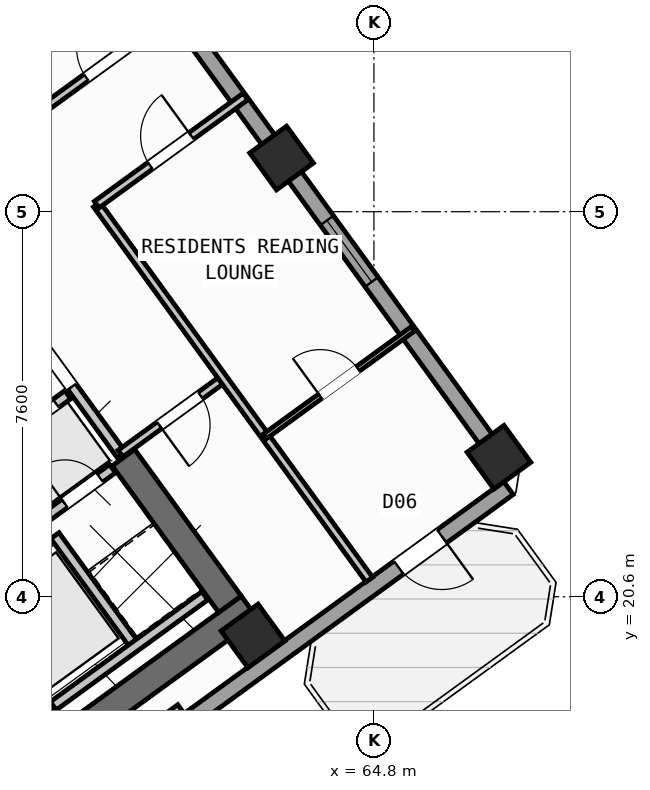
"""IFC4 building model, lengths in metres.
Left out: names, types, materials, properties, quantities, classifications, styles, units other than length and angle.
Written with IfcOpenShell. Run it as: python <this file> out.ifc"""

import sys

from ifc_helpers import new_model, si_unit, direction, frame, frame_2d, origin, origin_2d, place, context, subcontext, project, spatial, rectangle, hollow_rectangle, extrude, source, transform, mapped, element, fill, save


model = new_model("IFC4")
c1 = context("Model", 3, precision=1e-05, world=origin(), true_north=direction((0.0, 1.0)))
c2 = subcontext(c1, "Body", "Model", "MODEL_VIEW")
j1 = project(units=[si_unit("LENGTHUNIT", "METRE"), si_unit("PLANEANGLEUNIT", "RADIAN")], contexts=[c1])
p1 = place(None, origin())
s1 = spatial("IfcSite", under=j1, at=p1, CompositionType="ELEMENT")
p2 = place(p1, origin())
s2 = spatial("IfcBuilding", under=s1, at=p2, CompositionType="ELEMENT")
p3 = place(p2, frame((0.0, 0.0, 100.8)))
s3 = spatial("IfcBuildingStorey", under=s2, at=p3, CompositionType="ELEMENT", Elevation=100.8)
p4 = place(p3, frame((52.359, 13.14, 0.0), z_axis=(0.0, 0.0, 1.0), x_axis=(0.809014896919, 0.587788139183, 0.0)))
e1 = element("IfcWall", 1, at=p4, inside=s3, PredefinedType="SHEAR", context=c2, shape_type="SweptSolid", body=[
    extrude(rectangle(XDim=12.34, YDim=0.55, at=frame_2d((6.17, 0.0))), origin(), (0.0, 0.0, 1.0), 4.25),
])
p5 = place(p3, frame((61.958, 20.454, 0.0), z_axis=(0.0, 0.0, 1.0), x_axis=(-0.587802113096, 0.809004744015, 0.0)))
e2 = element("IfcWall", 2, at=p5, inside=s3, PredefinedType="SHEAR", context=c2, shape_type="SweptSolid", body=[
    extrude(rectangle(XDim=3.575, YDim=0.55, at=frame_2d((1.788, 0.0))), origin(), (0.0, 0.0, 1.0), 4.25),
])
m1 = source(origin(), c2, "Body", "SweptSolid", [
    extrude(hollow_rectangle(XDim=0.9, YDim=0.9, WallThickness=0.036, at=origin_2d()), origin(), (0.0, 0.0, 1.0), 4.5),
])
for number, where, z_axis, x_axis in (
    (3, (62.414, 19.827, 0.0), (0.0, 0.0, 1.0), (0.809, 0.588, 0.0)),
    (4, (67.268, 23.354, 0.0), (0.0, 0.0, 1.0), (0.809, 0.588, 0.0)),
    (5, (62.977, 29.259, 0.0), (0.0, 0.0, 1.0), (0.809, 0.588, 0.0)),
):
    element("IfcColumn", number, at=place(p3, frame(where, z_axis=z_axis, x_axis=x_axis)), inside=s3, PredefinedType="COLUMN", context=c2, shape_type="MappedRepresentation", body=[
        mapped(m1, transform((0.0, 0.0, 0.0), scale=1.0)),
    ])
p6 = place(p3, frame((54.81, 40.5, 0.0), z_axis=(0.0, 0.0, 1.0), x_axis=(0.587783625747, -0.809018176127, 0.0)))
e6 = element("IfcWall", 6, at=p6, inside=s3, PredefinedType="STANDARD", context=c2, shape_type="SweptSolid", body=[
    extrude(rectangle(XDim=21.587, YDim=0.32, at=frame_2d((10.794, 0.0))), origin(), (0.0, 0.0, 1.0), 3.675),
])
p7 = place(p6, frame((1.503, 0.0, 0.85)))
e7 = element("IfcOpeningElement", 7, at=p7, cuts=e6, PredefinedType="OPENING", context=c2, shape_type="SweptSolid", body=[
    extrude(rectangle(XDim=1.5, YDim=1.5, at=frame_2d((0.75, 0.75))), frame((0.0, 0.17, 0.0), z_axis=(0.0, -1.0, 0.0), x_axis=(1.0, 0.0, 0.0)), (0.0, 0.0, 1.0), 0.34),
])
p8 = place(p6, frame((7.854, 0.0, 0.85)))
e8 = element("IfcOpeningElement", 8, at=p8, cuts=e6, PredefinedType="OPENING", context=c2, shape_type="SweptSolid", body=[
    extrude(rectangle(XDim=1.5, YDim=1.5, at=frame_2d((0.75, 0.75))), frame((0.0, 0.17, 0.0), z_axis=(0.0, -1.0, 0.0), x_axis=(1.0, 0.0, 0.0)), (0.0, 0.0, 1.0), 0.34),
])
p9 = place(p6, frame((15.417, 0.0, 0.85)))
e9 = element("IfcOpeningElement", 9, at=p9, cuts=e6, PredefinedType="OPENING", context=c2, shape_type="SweptSolid", body=[
    extrude(rectangle(XDim=1.5, YDim=1.5, at=frame_2d((0.75, 0.75))), frame((0.0, 0.17, 0.0), z_axis=(0.0, -1.0, 0.0), x_axis=(1.0, 0.0, 0.0)), (0.0, 0.0, 1.0), 0.34),
])
p10 = place(p3, frame((67.454, 22.747, 0.0), z_axis=(0.0, 0.0, 1.0), x_axis=(-0.809021120468, -0.587779573171, 0.0)))
e10 = element("IfcWall", 10, at=p10, inside=s3, PredefinedType="STANDARD", context=c2, shape_type="SweptSolid", body=[
    extrude(rectangle(XDim=17.588, YDim=0.32, at=frame_2d((8.794, 0.0))), origin(), (0.0, 0.0, 1.0), 4.25),
])
p11 = place(p10, frame((1.624, 0.0, 0.0)))
e11 = element("IfcOpeningElement", 11, at=p11, cuts=e10, PredefinedType="OPENING", context=c2, shape_type="SweptSolid", body=[
    extrude(rectangle(XDim=1.05, YDim=2.15, at=frame_2d((0.525, 1.075))), frame((0.0, 0.17, 0.0), z_axis=(0.0, -1.0, 0.0), x_axis=(1.0, 0.0, 0.0)), (0.0, 0.0, 1.0), 0.34),
])
p12 = place(p10, frame((7.794, 0.0, 0.65)))
e12 = element("IfcOpeningElement", 12, at=p12, cuts=e10, PredefinedType="OPENING", context=c2, shape_type="SweptSolid", body=[
    extrude(rectangle(XDim=2.8, YDim=2.1, at=frame_2d((1.4, 1.05))), frame((0.0, 0.17, 0.0), z_axis=(0.0, -1.0, 0.0), x_axis=(1.0, 0.0, 0.0)), (0.0, 0.0, 1.0), 0.34),
])
p13 = place(p10, frame((12.994, 0.0, 0.65)))
e13 = element("IfcOpeningElement", 13, at=p13, cuts=e10, PredefinedType="OPENING", context=c2, shape_type="SweptSolid", body=[
    extrude(rectangle(XDim=2.8, YDim=2.1, at=frame_2d((1.4, 1.05))), frame((0.0, 0.17, 0.0), z_axis=(0.0, -1.0, 0.0), x_axis=(1.0, 0.0, 0.0)), (0.0, 0.0, 1.0), 0.34),
])
p14 = place(p3, frame((52.472, 14.013, 0.0), z_axis=(0.0, 0.0, 1.0), x_axis=(0.809028366311, 0.587769599847, 0.0)))
e14 = element("IfcWall", 14, at=p14, inside=s3, PredefinedType="SHEAR", context=c2, shape_type="SweptSolid", body=[
    extrude(rectangle(XDim=7.33, YDim=0.26, at=frame_2d((3.665, 0.0))), origin(), (0.0, 0.0, 1.0), 4.25),
])
p15 = place(p3, frame((58.41, 18.327, 0.0), z_axis=(0.0, 0.0, 1.0), x_axis=(-0.58776738483, 0.809029975545, 0.0)))
e15 = element("IfcWall", 15, at=p15, inside=s3, PredefinedType="SHEAR", context=c2, shape_type="SweptSolid", body=[
    extrude(rectangle(XDim=3.16, YDim=0.26, at=frame_2d((1.58, 0.0))), origin(), (0.0, 0.0, 1.0), 4.25),
])
p16 = place(p3, frame((56.553, 20.884, 0.0), z_axis=(0.0, 0.0, 1.0), x_axis=(0.809023564264, 0.58777620951, 0.0)))
e16 = element("IfcWall", 16, at=p16, inside=s3, PredefinedType="STANDARD", context=c2, shape_type="SweptSolid", body=[
    extrude(rectangle(XDim=3.818, YDim=0.2, at=frame_2d((1.909, 0.0))), origin(), (0.0, 0.0, 1.0), 4.24),
])
p17 = place(p16, frame((0.69, 0.0, 0.0)))
e17 = element("IfcOpeningElement", 17, at=p17, cuts=e16, PredefinedType="OPENING", context=c2, shape_type="SweptSolid", body=[
    extrude(rectangle(XDim=1.1, YDim=2.15, at=frame_2d((0.55, 1.075))), frame((0.0, 0.11, 0.0), z_axis=(0.0, -1.0, 0.0), x_axis=(1.0, 0.0, 0.0)), (0.0, 0.0, 1.0), 0.22),
])
p18 = place(p16, frame((2.65, 0.0, 0.0)))
e18 = element("IfcOpeningElement", 18, at=p18, cuts=e16, PredefinedType="OPENING", context=c2, shape_type="SweptSolid", body=[
    extrude(rectangle(XDim=0.86, YDim=2.05, at=frame_2d((0.43, 1.025))), frame((0.0, 0.11, 0.0), z_axis=(0.0, -1.0, 0.0), x_axis=(1.0, 0.0, 0.0)), (0.0, 0.0, 1.0), 0.22),
])
p19 = place(p3, frame((54.421, 21.436, 0.0), z_axis=(0.0, 0.0, 1.0), x_axis=(0.809013710463, 0.587789772183, 0.0)))
e19 = element("IfcWall", 19, at=p19, inside=s3, PredefinedType="STANDARD", context=c2, shape_type="SweptSolid", body=[
    extrude(rectangle(XDim=5.36, YDim=0.2, at=frame_2d((2.68, 0.0))), origin(), (0.0, 0.0, 1.0), 4.24),
])
p20 = place(p19, frame((0.37, 0.0, 0.0)))
e20 = element("IfcOpeningElement", 20, at=p20, cuts=e19, PredefinedType="OPENING", context=c2, shape_type="SweptSolid", body=[
    extrude(rectangle(XDim=1.1, YDim=2.15, at=frame_2d((0.55, 1.075))), frame((0.0, 0.11, 0.0), z_axis=(0.0, -1.0, 0.0), x_axis=(1.0, 0.0, 0.0)), (0.0, 0.0, 1.0), 0.22),
])
p21 = place(p19, frame((2.17, 0.0, 0.0)))
e21 = element("IfcOpeningElement", 21, at=p21, cuts=e19, PredefinedType="OPENING", context=c2, shape_type="SweptSolid", body=[
    extrude(rectangle(XDim=1.1, YDim=2.15, at=frame_2d((0.55, 1.075))), frame((0.0, 0.11, 0.0), z_axis=(0.0, -1.0, 0.0), x_axis=(1.0, 0.0, 0.0)), (0.0, 0.0, 1.0), 0.22),
])
p22 = place(p19, frame((3.97, 0.0, 0.0)))
e22 = element("IfcOpeningElement", 22, at=p22, cuts=e19, PredefinedType="OPENING", context=c2, shape_type="SweptSolid", body=[
    extrude(rectangle(XDim=1.1, YDim=2.15, at=frame_2d((0.55, 1.075))), frame((0.0, 0.11, 0.0), z_axis=(0.0, -1.0, 0.0), x_axis=(1.0, 0.0, 0.0)), (0.0, 0.0, 1.0), 0.22),
])
p23 = place(p3, frame((60.067, 19.655, 0.0), z_axis=(0.0, 0.0, 1.0), x_axis=(-0.587800520745, 0.809005900975, 0.0)))
e23 = element("IfcWall", 23, at=p23, inside=s3, PredefinedType="STANDARD", context=c2, shape_type="SweptSolid", body=[
    extrude(rectangle(XDim=2.66, YDim=0.2, at=frame_2d((1.33, 0.0))), origin(), (0.0, 0.0, 1.0), 4.24),
])
p24 = place(p3, frame((58.472, 18.447, 0.0), z_axis=(0.0, 0.0, 1.0), x_axis=(0.809018631237, 0.587782999339, 0.0)))
e24 = element("IfcWall", 24, at=p24, inside=s3, PredefinedType="STANDARD", context=c2, shape_type="SweptSolid", body=[
    extrude(rectangle(XDim=3.698, YDim=0.2, at=frame_2d((1.849, 0.0))), origin(), (0.0, 0.0, 1.0), 4.24),
])
p25 = place(p3, frame((59.827, 23.386, 0.0), z_axis=(0.0, 0.0, 1.0), x_axis=(-0.587803840107, 0.809003489211, 0.0)))
e25 = element("IfcWall", 25, at=p25, inside=s3, PredefinedType="STANDARD", context=c2, shape_type="SweptSolid", body=[
    extrude(rectangle(XDim=2.96, YDim=0.2, at=frame_2d((1.48, 0.0))), origin(), (0.0, 0.0, 1.0), 4.24),
])
p26 = place(p25, frame((1.68, 0.0, 0.0)))
e26 = element("IfcOpeningElement", 26, at=p26, cuts=e25, PredefinedType="OPENING", context=c2, shape_type="SweptSolid", body=[
    extrude(rectangle(XDim=1.0, YDim=2.1, at=frame_2d((0.5, 1.05))), frame((0.0, 0.11, 0.0), z_axis=(0.0, -1.0, 0.0), x_axis=(1.0, 0.0, 0.0)), (0.0, 0.0, 1.0), 0.22),
])
p27 = place(p3, frame((59.798, 23.427, 0.0), z_axis=(0.0, 0.0, 1.0), x_axis=(0.809034604122, 0.587761013791, 0.0)))
e27 = element("IfcWall", 27, at=p27, inside=s3, PredefinedType="PARTITIONING", context=c2, shape_type="SweptSolid", body=[
    extrude(rectangle(XDim=2.51, YDim=0.16, at=frame_2d((1.255, 0.0))), origin(), (0.0, 0.0, 1.0), 4.24),
])
p28 = place(p27, frame((0.95, 0.0, 0.0)))
e28 = element("IfcOpeningElement", 28, at=p28, cuts=e27, PredefinedType="OPENING", context=c2, shape_type="SweptSolid", body=[
    extrude(rectangle(XDim=1.0, YDim=2.1, at=frame_2d((0.5, 1.05))), frame((0.0, 0.09, 0.0), z_axis=(0.0, -1.0, 0.0), x_axis=(1.0, 0.0, 0.0)), (0.0, 0.0, 1.0), 0.18),
])
p29 = place(p3, frame((64.709, 20.938, 0.0), z_axis=(0.0, 0.0, 1.0), x_axis=(-0.587776590479, 0.80902328748, 0.0)))
e29 = element("IfcWall", 29, at=p29, inside=s3, PredefinedType="PARTITIONING", context=c2, shape_type="SweptSolid", body=[
    extrude(rectangle(XDim=9.15, YDim=0.16, at=frame_2d((4.575, 0.0))), origin(), (0.0, 0.0, 1.0), 4.24),
])
p30 = place(p3, frame((59.331, 28.341, 0.0), z_axis=(0.0, 0.0, 1.0), x_axis=(0.809003564202, 0.587803736896, 0.0)))
e30 = element("IfcWall", 30, at=p30, inside=s3, PredefinedType="PARTITIONING", context=c2, shape_type="SweptSolid", body=[
    extrude(rectangle(XDim=3.63, YDim=0.16, at=frame_2d((1.815, 0.0))), origin(), (0.0, 0.0, 1.0), 4.24),
])
p31 = place(p30, frame((1.305, 0.0, 0.0)))
e31 = element("IfcOpeningElement", 31, at=p31, cuts=e30, PredefinedType="OPENING", context=c2, shape_type="SweptSolid", body=[
    extrude(rectangle(XDim=1.0, YDim=2.1, at=frame_2d((0.5, 1.05))), frame((0.0, 0.09, 0.0), z_axis=(0.0, -1.0, 0.0), x_axis=(1.0, 0.0, 0.0)), (0.0, 0.0, 1.0), 0.18),
])
p32 = place(p3, frame((58.067, 30.08, 0.0), z_axis=(0.0, 0.0, 1.0), x_axis=(0.809012309495, 0.587791700422, 0.0)))
e32 = element("IfcWall", 32, at=p32, inside=s3, PredefinedType="PARTITIONING", context=c2, shape_type="SweptSolid", body=[
    extrude(rectangle(XDim=3.63, YDim=0.16, at=frame_2d((1.815, 0.0))), origin(), (0.0, 0.0, 1.0), 4.24),
])
p33 = place(p32, frame((1.305, 0.0, 0.0)))
e33 = element("IfcOpeningElement", 33, at=p33, cuts=e32, PredefinedType="OPENING", context=c2, shape_type="SweptSolid", body=[
    extrude(rectangle(XDim=1.0, YDim=2.1, at=frame_2d((0.5, 1.05))), frame((0.0, 0.09, 0.0), z_axis=(0.0, -1.0, 0.0), x_axis=(1.0, 0.0, 0.0)), (0.0, 0.0, 1.0), 0.18),
])
p34 = place(p3, frame((62.653, 23.768, 0.0), z_axis=(0.0, 0.0, 1.0), x_axis=(0.809037198293, 0.58775744298, 0.0)))
e34 = element("IfcWall", 34, at=p34, inside=s3, PredefinedType="PARTITIONING", context=c2, shape_type="SweptSolid", body=[
    extrude(rectangle(XDim=3.61, YDim=0.11, at=frame_2d((1.805, 0.0))), origin(), (0.0, 0.0, 1.0), 4.24),
])
p35 = place(p34, frame((1.345, 0.0, 0.0)))
e35 = element("IfcOpeningElement", 35, at=p35, cuts=e34, PredefinedType="OPENING", context=c2, shape_type="SweptSolid", body=[
    extrude(rectangle(XDim=0.92, YDim=2.08, at=frame_2d((0.46, 1.04))), frame((0.0, 0.065, 0.0), z_axis=(0.0, -1.0, 0.0), x_axis=(1.0, 0.0, 0.0)), (0.0, 0.0, 1.0), 0.13),
])
m2 = source(origin(), c2, "Body", "SweptSolid", [
    extrude(rectangle(XDim=1.05, YDim=2.15, at=frame_2d((0.525, 1.075))), frame((0.0, 0.025, 0.0), z_axis=(0.0, -1.0, 0.0), x_axis=(1.0, 0.0, 0.0)), (0.0, 0.0, 1.0), 0.05),
])
p36 = place(p11, origin())
e36 = element("IfcDoor", 36, at=p36, inside=s3, OperationType="SINGLE_SWING_LEFT", PredefinedType="DOOR", context=c2, shape_type="MappedRepresentation", body=[
    mapped(m2, transform((0.0, 0.0, 0.0), scale=1.0)),
])
fill(e11, e36)
m3 = source(origin(), c2, "Body", "SweptSolid", [
    extrude(rectangle(XDim=1.5, YDim=1.5, at=frame_2d((0.75, 0.75))), frame((0.0, 0.03, 0.0), z_axis=(0.0, -1.0, 0.0), x_axis=(1.0, 0.0, 0.0)), (0.0, 0.0, 1.0), 0.06),
])
p37 = place(p9, origin())
e37 = element("IfcWindow", 37, at=p37, inside=s3, PartitioningType="SINGLE_PANEL", PredefinedType="WINDOW", context=c2, shape_type="MappedRepresentation", body=[
    mapped(m3, transform((0.0, 0.0, 0.0), scale=1.0)),
])
fill(e9, e37)
m4 = source(origin(), c2, "Body", "SweptSolid", [
    extrude(rectangle(XDim=1.1, YDim=2.15, at=frame_2d((0.55, 1.075))), frame((0.0, 0.025, 0.0), z_axis=(0.0, -1.0, 0.0), x_axis=(1.0, 0.0, 0.0)), (0.0, 0.0, 1.0), 0.05),
])
p38 = place(p22, origin())
e38 = element("IfcDoor", 38, at=p38, inside=s3, OperationType="DOUBLE_DOOR_SLIDING", PredefinedType="DOOR", context=c2, shape_type="MappedRepresentation", body=[
    mapped(m4, transform((0.0, 0.0, 0.0), scale=1.0)),
])
fill(e22, e38)
m5 = source(origin(), c2, "Body", "SweptSolid", [
    extrude(rectangle(XDim=0.86, YDim=2.05, at=frame_2d((0.43, 1.025))), frame((0.0, 0.025, 0.0), z_axis=(0.0, -1.0, 0.0), x_axis=(1.0, 0.0, 0.0)), (0.0, 0.0, 1.0), 0.05),
])
p39 = place(p18, origin())
e39 = element("IfcDoor", 39, at=p39, inside=s3, OperationType="SINGLE_SWING_LEFT", PredefinedType="DOOR", context=c2, shape_type="MappedRepresentation", body=[
    mapped(m5, transform((0.0, 0.0, 0.0), scale=1.0)),
])
fill(e18, e39)
m6 = source(origin(), c2, "Body", "SweptSolid", [
    extrude(rectangle(XDim=1.0, YDim=2.1, at=frame_2d((0.5, 1.05))), frame((0.0, 0.025, 0.0), z_axis=(0.0, -1.0, 0.0), x_axis=(1.0, 0.0, 0.0)), (0.0, 0.0, 1.0), 0.05),
])
p40 = place(p28, frame((1.0, 0.0, 0.0), z_axis=(0.0, 0.0, 1.0), x_axis=(-1.0, 0.0, 0.0)))
e40 = element("IfcDoor", 40, at=p40, inside=s3, OperationType="SINGLE_SWING_RIGHT", PredefinedType="DOOR", context=c2, shape_type="MappedRepresentation", body=[
    mapped(m6, transform((0.0, 0.0, 0.0), scale=1.0)),
])
fill(e28, e40)
p41 = place(p26, origin())
e41 = element("IfcDoor", 41, at=p41, inside=s3, OperationType="SINGLE_SWING_LEFT", PredefinedType="DOOR", context=c2, shape_type="MappedRepresentation", body=[
    mapped(m6, transform((0.0, 0.0, 0.0), scale=1.0)),
])
fill(e26, e41)
p42 = place(p33, origin())
e42 = element("IfcDoor", 42, at=p42, inside=s3, OperationType="SINGLE_SWING_RIGHT", PredefinedType="DOOR", context=c2, shape_type="MappedRepresentation", body=[
    mapped(m6, transform((0.0, 0.0, 0.0), scale=1.0)),
])
fill(e33, e42)
p43 = place(p31, origin())
e43 = element("IfcDoor", 43, at=p43, inside=s3, OperationType="SINGLE_SWING_RIGHT", PredefinedType="DOOR", context=c2, shape_type="MappedRepresentation", body=[
    mapped(m6, transform((0.0, 0.0, 0.0), scale=1.0)),
])
fill(e31, e43)
m7 = source(origin(), c2, "Body", "SweptSolid", [
    extrude(rectangle(XDim=0.92, YDim=2.08, at=frame_2d((0.46, 1.04))), frame((0.0, 0.025, 0.0), z_axis=(0.0, -1.0, 0.0), x_axis=(1.0, 0.0, 0.0)), (0.0, 0.0, 1.0), 0.05),
])
p44 = place(p35, origin())
e44 = element("IfcDoor", 44, at=p44, inside=s3, OperationType="SINGLE_SWING_LEFT", PredefinedType="DOOR", context=c2, shape_type="MappedRepresentation", body=[
    mapped(m7, transform((0.0, 0.0, 0.0), scale=1.0)),
])
fill(e35, e44)
save(model, sys.argv[1])
